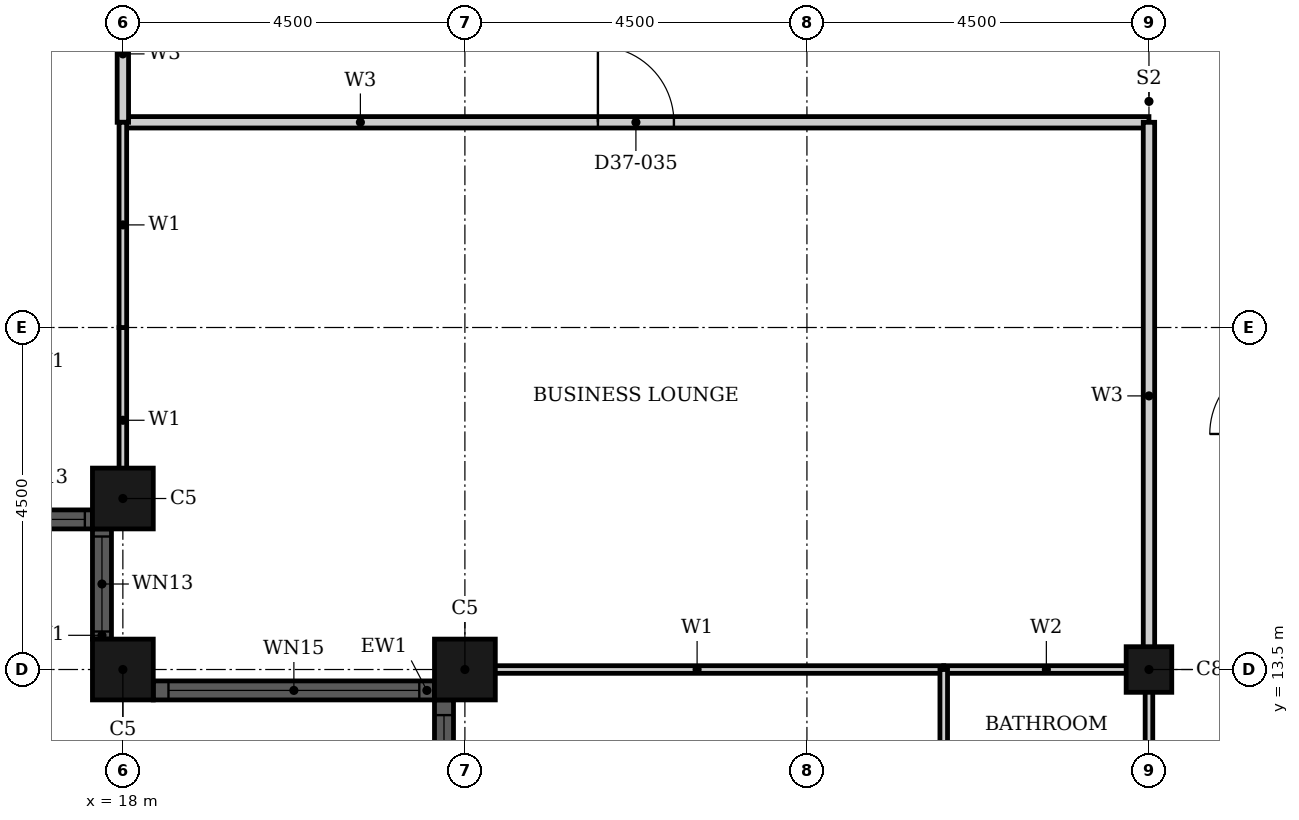
"""IFC4 building model, lengths in metres.
Left out: names, types, materials, properties, quantities, classifications, styles, units other than length and angle.
Written with IfcOpenShell. Run it as: python <this file> out.ifc"""

import sys

from ifc_helpers import new_model, si_unit, direction, frame, frame_2d, origin, origin_2d, place, context, subcontext, project, spatial, rectangle, hollow_rectangle, extrude, element, fill, save


model = new_model("IFC4")
c1 = context("Model", 3, precision=1e-05, world=origin(), true_north=direction((0.0, 1.0)))
c2 = subcontext(c1, "Body", "Model", "MODEL_VIEW")
j1 = project(units=[si_unit("LENGTHUNIT", "METRE"), si_unit("PLANEANGLEUNIT", "RADIAN")], contexts=[c1])
p1 = place(None, origin())
s1 = spatial("IfcSite", under=j1, at=p1, CompositionType="ELEMENT")
p2 = place(p1, origin())
s2 = spatial("IfcBuilding", under=s1, at=p2, CompositionType="ELEMENT")
p3 = place(p2, frame((0.0, 0.0, 150.6)))
s3 = spatial("IfcBuildingStorey", under=s2, at=p3, CompositionType="ELEMENT", Elevation=150.6)
for number, where, z_axis, x_axis in (
    (1, (18.0, 15.75, 0.0), (0.0, 0.0, 1.0), (1.0, 0.0, 0.0)),
    (2, (18.0, 13.5, 0.0), (0.0, 0.0, 1.0), (1.0, 0.0, 0.0)),
    (3, (22.5, 13.5, 0.0), (0.0, 0.0, 1.0), (1.0, 0.0, 0.0)),
):
    element("IfcColumn", number, at=place(p3, frame(where, z_axis=z_axis, x_axis=x_axis)), inside=s3, PredefinedType="COLUMN", context=c2, shape_type="SweptSolid", body=[
        extrude(hollow_rectangle(XDim=0.8, YDim=0.8, WallThickness=0.025, at=origin_2d()), origin(), (0.0, 0.0, 1.0), 3.7),
    ])
p4 = place(p3, frame((31.5, 13.5, 0.0), z_axis=(0.0, 0.0, 1.0), x_axis=(1.0, 0.0, 0.0)))
e4 = element("IfcColumn", 4, at=p4, inside=s3, PredefinedType="COLUMN", context=c2, shape_type="SweptSolid", body=[
    extrude(hollow_rectangle(XDim=0.6, YDim=0.6, WallThickness=0.02, at=origin_2d()), origin(), (0.0, 0.0, 1.0), 3.7),
])
p5 = place(p3, frame((16.15, 15.475, 0.0), z_axis=(0.0, 0.0, 1.0), x_axis=(1.0, 0.0, 0.0)))
e5 = element("IfcWall", 5, at=p5, inside=s3, PredefinedType="SOLIDWALL", context=c2, shape_type="SweptSolid", body=[
    extrude(rectangle(XDim=1.45, YDim=0.25, at=frame_2d((0.725, 0.0))), origin(), (0.0, 0.0, 1.0), 3.7),
])
p6 = place(p5, frame((0.1, 0.0, 0.9)))
e6 = element("IfcOpeningElement", 6, at=p6, cuts=e5, PredefinedType="OPENING", context=c2, shape_type="SweptSolid", body=[
    extrude(rectangle(XDim=1.25, YDim=1.85, at=frame_2d((0.625, 0.925))), frame((0.0, 0.135, 0.0), z_axis=(0.0, -1.0, 0.0), x_axis=(1.0, 0.0, 0.0)), (0.0, 0.0, 1.0), 0.27),
])
p7 = place(p3, frame((17.725, 15.35, 0.0), z_axis=(0.0, 0.0, 1.0), x_axis=(0.0, -1.0, 0.0)))
e7 = element("IfcWall", 7, at=p7, inside=s3, PredefinedType="SOLIDWALL", context=c2, shape_type="SweptSolid", body=[
    extrude(rectangle(XDim=1.45, YDim=0.25, at=frame_2d((0.725, 0.0))), origin(), (0.0, 0.0, 1.0), 3.7),
])
p8 = place(p7, frame((0.1, 0.0, 0.9)))
e8 = element("IfcOpeningElement", 8, at=p8, cuts=e7, PredefinedType="OPENING", context=c2, shape_type="SweptSolid", body=[
    extrude(rectangle(XDim=1.25, YDim=1.85, at=frame_2d((0.625, 0.925))), frame((0.0, 0.135, 0.0), z_axis=(0.0, -1.0, 0.0), x_axis=(1.0, 0.0, 0.0)), (0.0, 0.0, 1.0), 0.27),
])
p9 = place(p3, frame((18.4, 13.225, 0.0), z_axis=(0.0, 0.0, 1.0), x_axis=(1.0, 0.0, 0.0)))
e9 = element("IfcWall", 9, at=p9, inside=s3, PredefinedType="SOLIDWALL", context=c2, shape_type="SweptSolid", body=[
    extrude(rectangle(XDim=3.7, YDim=0.25, at=frame_2d((1.85, 0.0))), origin(), (0.0, 0.0, 1.0), 3.7),
])
p10 = place(p9, frame((0.2, 0.0, 0.45)))
e10 = element("IfcOpeningElement", 10, at=p10, cuts=e9, PredefinedType="OPENING", context=c2, shape_type="SweptSolid", body=[
    extrude(rectangle(XDim=3.3, YDim=2.3, at=frame_2d((1.65, 1.15))), frame((0.0, 0.135, 0.0), z_axis=(0.0, -1.0, 0.0), x_axis=(1.0, 0.0, 0.0)), (0.0, 0.0, 1.0), 0.27),
])
p11 = place(p3, frame((22.225, 13.1, 0.0), z_axis=(0.0, 0.0, 1.0), x_axis=(0.0, -1.0, 0.0)))
e11 = element("IfcWall", 11, at=p11, inside=s3, PredefinedType="SOLIDWALL", context=c2, shape_type="SweptSolid", body=[
    extrude(rectangle(XDim=8.2, YDim=0.25, at=frame_2d((4.1, 0.0))), origin(), (0.0, 0.0, 1.0), 3.7),
])
p12 = place(p11, frame((0.2, 0.0, 0.45)))
e12 = element("IfcOpeningElement", 12, at=p12, cuts=e11, PredefinedType="OPENING", context=c2, shape_type="SweptSolid", body=[
    extrude(rectangle(XDim=3.3, YDim=2.3, at=frame_2d((1.65, 1.15))), frame((0.0, 0.135, 0.0), z_axis=(0.0, -1.0, 0.0), x_axis=(1.0, 0.0, 0.0)), (0.0, 0.0, 1.0), 0.27),
])
p13 = place(p11, frame((4.7, 0.0, 0.45)))
e13 = element("IfcOpeningElement", 13, at=p13, cuts=e11, PredefinedType="OPENING", context=c2, shape_type="SweptSolid", body=[
    extrude(rectangle(XDim=3.3, YDim=2.3, at=frame_2d((1.65, 1.15))), frame((0.0, 0.135, 0.0), z_axis=(0.0, -1.0, 0.0), x_axis=(1.0, 0.0, 0.0)), (0.0, 0.0, 1.0), 0.27),
])
p14 = place(p3, frame((18.0, 20.7, 0.0), z_axis=(0.0, 0.0, 1.0), x_axis=(1.0, 0.0, 0.0)))
e14 = element("IfcWall", 14, at=p14, inside=s3, PredefinedType="PARTITIONING", context=c2, shape_type="SweptSolid", body=[
    extrude(rectangle(XDim=13.5, YDim=0.15, at=frame_2d((6.75, 0.0))), origin(), (0.0, 0.0, 1.0), 3.4),
])
p15 = place(p14, frame((6.25, 0.0, 0.0)))
e15 = element("IfcOpeningElement", 15, at=p15, cuts=e14, PredefinedType="OPENING", context=c2, shape_type="SweptSolid", body=[
    extrude(rectangle(XDim=1.0, YDim=2.1, at=frame_2d((0.5, 1.05))), frame((0.0, 0.085, 0.0), z_axis=(0.0, -1.0, 0.0), x_axis=(1.0, 0.0, 0.0)), (0.0, 0.0, 1.0), 0.17),
])
p16 = place(p3, frame((18.0, 20.7, 0.0), z_axis=(0.0, 0.0, 1.0), x_axis=(0.0, 1.0, 0.0)))
e16 = element("IfcWall", 16, at=p16, inside=s3, PredefinedType="PARTITIONING", context=c2, shape_type="SweptSolid", body=[
    extrude(rectangle(XDim=1.8, YDim=0.15, at=frame_2d((0.9, 0.0))), origin(), (0.0, 0.0, 1.0), 3.4),
])
p17 = place(p3, frame((31.5, 13.5, 0.0), z_axis=(0.0, 0.0, 1.0), x_axis=(0.0, 1.0, 0.0)))
e17 = element("IfcWall", 17, at=p17, inside=s3, PredefinedType="PARTITIONING", context=c2, shape_type="SweptSolid", body=[
    extrude(rectangle(XDim=7.2, YDim=0.15, at=frame_2d((3.6, 0.0))), origin(), (0.0, 0.0, 1.0), 3.4),
])
p18 = place(p3, frame((22.31, 13.5, 0.0), z_axis=(0.0, 0.0, 1.0), x_axis=(1.0, 0.0, 0.0)))
e18 = element("IfcWall", 18, at=p18, inside=s3, PredefinedType="PARTITIONING", context=c2, shape_type="SweptSolid", body=[
    extrude(rectangle(XDim=6.49, YDim=0.1, at=frame_2d((3.245, 0.0))), origin(), (0.0, 0.0, 1.0), 2.48),
])
p19 = place(p3, frame((18.0, 15.56, 0.0), z_axis=(0.0, 0.0, 1.0), x_axis=(0.0, 1.0, 0.0)))
e19 = element("IfcWall", 19, at=p19, inside=s3, PredefinedType="PARTITIONING", context=c2, shape_type="SweptSolid", body=[
    extrude(rectangle(XDim=2.439, YDim=0.1, at=frame_2d((1.219, 0.0))), origin(), (0.0, 0.0, 1.0), 3.4),
])
p20 = place(p3, frame((18.0, 18.0, 0.0), z_axis=(0.0, 0.0, 1.0), x_axis=(0.0, 1.0, 0.0)))
e20 = element("IfcWall", 20, at=p20, inside=s3, PredefinedType="PARTITIONING", context=c2, shape_type="SweptSolid", body=[
    extrude(rectangle(XDim=2.7, YDim=0.1, at=frame_2d((1.35, 0.0))), origin(), (0.0, 0.0, 1.0), 3.4),
])
p21 = place(p3, frame((28.8, 13.5, 0.0), z_axis=(0.0, 0.0, 1.0), x_axis=(1.0, 0.0, 0.0)))
e21 = element("IfcWall", 21, at=p21, inside=s3, PredefinedType="PARTITIONING", context=c2, shape_type="SweptSolid", body=[
    extrude(rectangle(XDim=2.7, YDim=0.1, at=frame_2d((1.35, 0.0))), origin(), (0.0, 0.0, 1.0), 2.48),
])
p22 = place(p3, frame((28.8, 11.1, 0.0), z_axis=(0.0, 0.0, 1.0), x_axis=(0.0, 1.0, 0.0)))
e22 = element("IfcWall", 22, at=p22, inside=s3, PredefinedType="PARTITIONING", context=c2, shape_type="SweptSolid", body=[
    extrude(rectangle(XDim=2.4, YDim=0.1, at=frame_2d((1.2, 0.0))), origin(), (0.0, 0.0, 1.0), 3.4),
])
p23 = place(p3, frame((31.5, 11.1, 0.0), z_axis=(0.0, 0.0, 1.0), x_axis=(0.0, 1.0, 0.0)))
e23 = element("IfcWall", 23, at=p23, inside=s3, PredefinedType="PARTITIONING", context=c2, shape_type="SweptSolid", body=[
    extrude(rectangle(XDim=2.4, YDim=0.1, at=frame_2d((1.2, 0.0))), origin(), (0.0, 0.0, 1.0), 2.68),
])
p24 = place(p6, origin())
e24 = element("IfcWindow", 24, at=p24, inside=s3, PartitioningType="SINGLE_PANEL", PredefinedType="WINDOW", context=c2, shape_type="SweptSolid", body=[
    extrude(rectangle(XDim=1.25, YDim=1.85, at=frame_2d((0.625, 0.925))), frame((0.0, 0.03, 0.0), z_axis=(0.0, -1.0, 0.0), x_axis=(1.0, 0.0, 0.0)), (0.0, 0.0, 1.0), 0.06),
])
fill(e6, e24)
p25 = place(p8, origin())
e25 = element("IfcWindow", 25, at=p25, inside=s3, PartitioningType="SINGLE_PANEL", PredefinedType="WINDOW", context=c2, shape_type="SweptSolid", body=[
    extrude(rectangle(XDim=1.25, YDim=1.85, at=frame_2d((0.625, 0.925))), frame((0.0, 0.03, 0.0), z_axis=(0.0, -1.0, 0.0), x_axis=(1.0, 0.0, 0.0)), (0.0, 0.0, 1.0), 0.06),
])
fill(e8, e25)
p26 = place(p10, origin())
e26 = element("IfcWindow", 26, at=p26, inside=s3, PartitioningType="SINGLE_PANEL", PredefinedType="WINDOW", context=c2, shape_type="SweptSolid", body=[
    extrude(rectangle(XDim=3.3, YDim=2.3, at=frame_2d((1.65, 1.15))), frame((0.0, 0.03, 0.0), z_axis=(0.0, -1.0, 0.0), x_axis=(1.0, 0.0, 0.0)), (0.0, 0.0, 1.0), 0.06),
])
fill(e10, e26)
p27 = place(p12, origin())
e27 = element("IfcWindow", 27, at=p27, inside=s3, PartitioningType="SINGLE_PANEL", PredefinedType="WINDOW", context=c2, shape_type="SweptSolid", body=[
    extrude(rectangle(XDim=3.3, YDim=2.3, at=frame_2d((1.65, 1.15))), frame((0.0, 0.03, 0.0), z_axis=(0.0, -1.0, 0.0), x_axis=(1.0, 0.0, 0.0)), (0.0, 0.0, 1.0), 0.06),
])
fill(e12, e27)
p28 = place(p15, origin())
e28 = element("IfcDoor", 28, at=p28, inside=s3, OperationType="SINGLE_SWING_RIGHT", PredefinedType="DOOR", context=c2, shape_type="SweptSolid", body=[
    extrude(rectangle(XDim=1.0, YDim=2.1, at=frame_2d((0.5, 1.05))), frame((0.0, 0.025, 0.0), z_axis=(0.0, -1.0, 0.0), x_axis=(1.0, 0.0, 0.0)), (0.0, 0.0, 1.0), 0.05),
])
fill(e15, e28)
save(model, sys.argv[1])
